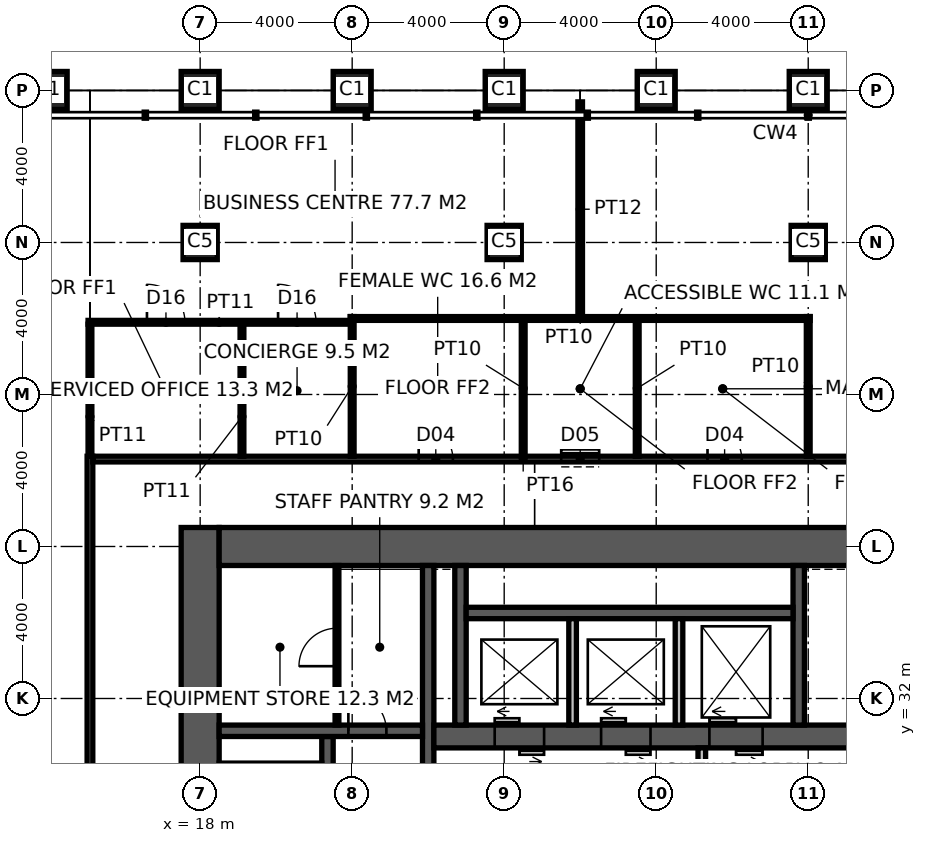
"""IFC4 building model, lengths in metres.
Left out: names, types, materials, properties, quantities, classifications, styles, units other than length and angle.
Written with IfcOpenShell. Run it as: python <this file> out.ifc"""

import sys

from ifc_helpers import new_model, si_unit, direction, frame, frame_2d, origin, origin_2d, place, context, subcontext, project, spatial, rectangle, hollow_rectangle, extrude, element, fill, save


model = new_model("IFC4")
c1 = context("Model", 3, precision=1e-05, world=origin(), true_north=direction((0.0, 1.0)))
c2 = subcontext(c1, "Body", "Model", "MODEL_VIEW")
j1 = project(units=[si_unit("LENGTHUNIT", "METRE"), si_unit("PLANEANGLEUNIT", "RADIAN")], contexts=[c1])
p1 = place(None, origin())
s1 = spatial("IfcSite", under=j1, at=p1, CompositionType="ELEMENT")
p2 = place(p1, origin())
s2 = spatial("IfcBuilding", under=s1, at=p2, CompositionType="ELEMENT")
p3 = place(p2, frame((0.0, 0.0, 76.4)))
s3 = spatial("IfcBuildingStorey", under=s2, at=p3, CompositionType="ELEMENT", Elevation=76.4)
for number, where, z_axis, x_axis in (
    (1, (14.0, 48.0, 0.0), (0.0, 0.0, 1.0), (1.0, 0.0, 0.0)),
    (2, (18.0, 48.0, 0.0), (0.0, 0.0, 1.0), (1.0, 0.0, 0.0)),
    (3, (22.0, 48.0, 0.0), (0.0, 0.0, 1.0), (1.0, 0.0, 0.0)),
    (4, (26.0, 48.0, 0.0), (0.0, 0.0, 1.0), (1.0, 0.0, 0.0)),
    (5, (30.0, 48.0, 0.0), (0.0, 0.0, 1.0), (1.0, 0.0, 0.0)),
    (6, (34.0, 48.0, 0.0), (0.0, 0.0, 1.0), (1.0, 0.0, 0.0)),
):
    element("IfcColumn", number, at=place(p3, frame(where, z_axis=z_axis, x_axis=x_axis)), inside=s3, PredefinedType="COLUMN", context=c2, shape_type="SweptSolid", body=[
        extrude(hollow_rectangle(XDim=1.0, YDim=1.0, WallThickness=0.1, at=origin_2d()), origin(), (0.0, 0.0, 1.0), 5.0),
    ])
for number, where, z_axis, x_axis in (
    (7, (18.0, 44.0, 0.0), (0.0, 0.0, 1.0), (1.0, 0.0, 0.0)),
    (8, (26.0, 44.0, 0.0), (0.0, 0.0, 1.0), (1.0, 0.0, 0.0)),
    (9, (34.0, 44.0, 0.0), (0.0, 0.0, 1.0), (1.0, 0.0, 0.0)),
):
    element("IfcColumn", number, at=place(p3, frame(where, z_axis=z_axis, x_axis=x_axis)), inside=s3, PredefinedType="COLUMN", context=c2, shape_type="SweptSolid", body=[
        extrude(hollow_rectangle(XDim=0.9, YDim=0.9, WallThickness=0.1, at=origin_2d()), origin(), (0.0, 0.0, 1.0), 5.0),
    ])
p4 = place(p3, frame((18.0, 17.5, -0.15), z_axis=(0.0, 0.0, 1.0), x_axis=(0.0, 1.0, 0.0)))
e10 = element("IfcWall", 10, at=p4, inside=s3, PredefinedType="SHEAR", context=c2, shape_type="SweptSolid", body=[
    extrude(rectangle(XDim=19.0, YDim=1.0, at=frame_2d((9.5, 0.0))), origin(), (0.0, 0.0, 1.0), 5.0),
])
p5 = place(p3, frame((18.5, 36.0, -0.15), z_axis=(0.0, 0.0, 1.0), x_axis=(1.0, 0.0, 0.0)))
e11 = element("IfcWall", 11, at=p5, inside=s3, PredefinedType="SHEAR", context=c2, shape_type="SweptSolid", body=[
    extrude(rectangle(XDim=17.6, YDim=1.0, at=frame_2d((8.8, 0.0))), origin(), (0.0, 0.0, 1.0), 5.0),
])
p6 = place(p3, frame((24.0, 18.5, -0.15), z_axis=(0.0, 0.0, 1.0), x_axis=(0.0, 1.0, 0.0)))
e12 = element("IfcWall", 12, at=p6, inside=s3, PredefinedType="SHEAR", context=c2, shape_type="SweptSolid", body=[
    extrude(rectangle(XDim=17.0, YDim=0.3, at=frame_2d((8.5, 0.0))), origin(), (0.0, 0.0, 1.0), 5.0),
])
p7 = place(p6, frame((9.6, 0.0, 0.15)))
e13 = element("IfcOpeningElement", 13, at=p7, cuts=e12, PredefinedType="OPENING", context=c2, shape_type="SweptSolid", body=[
    extrude(rectangle(XDim=1.5, YDim=2.4, at=frame_2d((0.75, 1.2))), frame((0.0, 0.16, 0.0), z_axis=(0.0, -1.0, 0.0), x_axis=(1.0, 0.0, 0.0)), (0.0, 0.0, 1.0), 0.32),
])
p8 = place(p3, frame((24.15, 31.0, -0.15), z_axis=(0.0, 0.0, 1.0), x_axis=(1.0, 0.0, 0.0)))
e14 = element("IfcWall", 14, at=p8, inside=s3, PredefinedType="SHEAR", context=c2, shape_type="SweptSolid", body=[
    extrude(rectangle(XDim=11.25, YDim=0.6, at=frame_2d((5.625, 0.0))), origin(), (0.0, 0.0, 1.0), 5.0),
])
p9 = place(p8, frame((1.6, 0.0, 0.15)))
e15 = element("IfcOpeningElement", 15, at=p9, cuts=e14, PredefinedType="OPENING", context=c2, shape_type="SweptSolid", body=[
    extrude(rectangle(XDim=1.3, YDim=2.4, at=frame_2d((0.65, 1.2))), frame((0.0, 0.31, 0.0), z_axis=(0.0, -1.0, 0.0), x_axis=(1.0, 0.0, 0.0)), (0.0, 0.0, 1.0), 0.62),
])
p10 = place(p8, frame((4.4, 0.0, 0.15)))
e16 = element("IfcOpeningElement", 16, at=p10, cuts=e14, PredefinedType="OPENING", context=c2, shape_type="SweptSolid", body=[
    extrude(rectangle(XDim=1.3, YDim=2.4, at=frame_2d((0.65, 1.2))), frame((0.0, 0.31, 0.0), z_axis=(0.0, -1.0, 0.0), x_axis=(1.0, 0.0, 0.0)), (0.0, 0.0, 1.0), 0.62),
])
p11 = place(p8, frame((7.25, 0.0, 0.15)))
e17 = element("IfcOpeningElement", 17, at=p11, cuts=e14, PredefinedType="OPENING", context=c2, shape_type="SweptSolid", body=[
    extrude(rectangle(XDim=1.4, YDim=2.4, at=frame_2d((0.7, 1.2))), frame((0.0, 0.31, 0.0), z_axis=(0.0, -1.0, 0.0), x_axis=(1.0, 0.0, 0.0)), (0.0, 0.0, 1.0), 0.62),
])
p12 = place(p3, frame((21.35, 18.5, -0.15), z_axis=(0.0, 0.0, 1.0), x_axis=(0.0, 1.0, 0.0)))
e18 = element("IfcWall", 18, at=p12, inside=s3, PredefinedType="SHEAR", context=c2, shape_type="SweptSolid", body=[
    extrude(rectangle(XDim=12.5, YDim=0.3, at=frame_2d((6.25, 0.0))), origin(), (0.0, 0.0, 1.0), 5.0),
])
p13 = place(p12, frame((0.875, 0.0, 0.15)))
e19 = element("IfcOpeningElement", 19, at=p13, cuts=e18, PredefinedType="OPENING", context=c2, shape_type="SweptSolid", body=[
    extrude(rectangle(XDim=1.1, YDim=2.2, at=frame_2d((0.55, 1.1))), frame((0.0, 0.16, 0.0), z_axis=(0.0, -1.0, 0.0), x_axis=(1.0, 0.0, 0.0)), (0.0, 0.0, 1.0), 0.32),
])
p14 = place(p12, frame((3.825, 0.0, 0.15)))
e20 = element("IfcOpeningElement", 20, at=p14, cuts=e18, PredefinedType="OPENING", context=c2, shape_type="SweptSolid", body=[
    extrude(rectangle(XDim=1.1, YDim=2.2, at=frame_2d((0.55, 1.1))), frame((0.0, 0.16, 0.0), z_axis=(0.0, -1.0, 0.0), x_axis=(1.0, 0.0, 0.0)), (0.0, 0.0, 1.0), 0.32),
])
p15 = place(p12, frame((6.675, 0.0, 0.15)))
e21 = element("IfcOpeningElement", 21, at=p15, cuts=e18, PredefinedType="OPENING", context=c2, shape_type="SweptSolid", body=[
    extrude(rectangle(XDim=1.1, YDim=2.2, at=frame_2d((0.55, 1.1))), frame((0.0, 0.16, 0.0), z_axis=(0.0, -1.0, 0.0), x_axis=(1.0, 0.0, 0.0)), (0.0, 0.0, 1.0), 0.32),
])
p16 = place(p12, frame((9.575, 0.0, 0.15)))
e22 = element("IfcOpeningElement", 22, at=p16, cuts=e18, PredefinedType="OPENING", context=c2, shape_type="SweptSolid", body=[
    extrude(rectangle(XDim=1.1, YDim=2.2, at=frame_2d((0.55, 1.1))), frame((0.0, 0.16, 0.0), z_axis=(0.0, -1.0, 0.0), x_axis=(1.0, 0.0, 0.0)), (0.0, 0.0, 1.0), 0.32),
])
p17 = place(p3, frame((18.5, 31.15, -0.15), z_axis=(0.0, 0.0, 1.0), x_axis=(1.0, 0.0, 0.0)))
e23 = element("IfcWall", 23, at=p17, inside=s3, PredefinedType="SHEAR", context=c2, shape_type="SweptSolid", body=[
    extrude(rectangle(XDim=5.35, YDim=0.3, at=frame_2d((2.675, 0.0))), origin(), (0.0, 0.0, 1.0), 5.0),
])
p18 = place(p17, frame((3.4, 0.0, 0.15)))
e24 = element("IfcOpeningElement", 24, at=p18, cuts=e23, PredefinedType="OPENING", context=c2, shape_type="SweptSolid", body=[
    extrude(rectangle(XDim=1.0, YDim=2.2, at=frame_2d((0.5, 1.1))), frame((0.0, 0.16, 0.0), z_axis=(0.0, -1.0, 0.0), x_axis=(1.0, 0.0, 0.0)), (0.0, 0.0, 1.0), 0.32),
])
for number, where, z_axis, x_axis in (
    (25, (24.85, 31.3, -0.15), (0.0, 0.0, 1.0), (0.0, 1.0, 0.0)),
    (26, (33.75, 31.3, -0.15), (0.0, 0.0, 1.0), (0.0, 1.0, 0.0)),
):
    element("IfcWall", number, at=place(p3, frame(where, z_axis=z_axis, x_axis=x_axis)), inside=s3, PredefinedType="SHEAR", context=c2, shape_type="SweptSolid", body=[
        extrude(rectangle(XDim=4.2, YDim=0.3, at=frame_2d((2.1, 0.0))), origin(), (0.0, 0.0, 1.0), 5.0),
    ])
p19 = place(p3, frame((25.0, 34.25, -0.15), z_axis=(0.0, 0.0, 1.0), x_axis=(1.0, 0.0, 0.0)))
e27 = element("IfcWall", 27, at=p19, inside=s3, PredefinedType="SHEAR", context=c2, shape_type="SweptSolid", body=[
    extrude(rectangle(XDim=8.6, YDim=0.3, at=frame_2d((4.3, 0.0))), origin(), (0.0, 0.0, 1.0), 5.0),
])
for number, where, z_axis, x_axis in (
    (28, (27.8, 31.3, -0.15), (0.0, 0.0, 1.0), (0.0, 1.0, 0.0)),
    (29, (30.6, 31.3, -0.15), (0.0, 0.0, 1.0), (0.0, 1.0, 0.0)),
):
    element("IfcWall", number, at=place(p3, frame(where, z_axis=z_axis, x_axis=x_axis)), inside=s3, PredefinedType="SOLIDWALL", context=c2, shape_type="SweptSolid", body=[
        extrude(rectangle(XDim=2.8, YDim=0.2, at=frame_2d((1.4, 0.0))), origin(), (0.0, 0.0, 1.0), 5.0),
    ])
p20 = place(p3, frame((31.2, 27.0, 0.0), z_axis=(0.0, 0.0, 1.0), x_axis=(0.0, 1.0, 0.0)))
e30 = element("IfcWall", 30, at=p20, inside=s3, PredefinedType="SOLIDWALL", context=c2, shape_type="SweptSolid", body=[
    extrude(rectangle(XDim=3.7, YDim=0.2, at=frame_2d((1.85, 0.0))), origin(), (0.0, 0.0, 1.0), 4.85),
])
p21 = place(p3, frame((21.6, 31.3, 0.0), z_axis=(0.0, 0.0, 1.0), x_axis=(0.0, 1.0, 0.0)))
e31 = element("IfcWall", 31, at=p21, inside=s3, PredefinedType="PARTITIONING", context=c2, shape_type="SweptSolid", body=[
    extrude(rectangle(XDim=4.2, YDim=0.1, at=frame_2d((2.1, 0.0))), origin(), (0.0, 0.0, 1.0), 4.85),
])
p22 = place(p21, frame((1.55, 0.0, 0.0)))
e32 = element("IfcOpeningElement", 32, at=p22, cuts=e31, PredefinedType="OPENING", context=c2, shape_type="SweptSolid", body=[
    extrude(rectangle(XDim=1.0, YDim=2.2, at=frame_2d((0.5, 1.1))), frame((0.0, 0.06, 0.0), z_axis=(0.0, -1.0, 0.0), x_axis=(1.0, 0.0, 0.0)), (0.0, 0.0, 1.0), 0.12),
])
p23 = place(p3, frame((15.1, 15.625, 0.0), z_axis=(0.0, 0.0, 1.0), x_axis=(0.0, 1.0, 0.0)))
e33 = element("IfcWall", 33, at=p23, inside=s3, PredefinedType="PARTITIONING", context=c2, shape_type="SweptSolid", body=[
    extrude(rectangle(XDim=22.75, YDim=0.15, at=frame_2d((11.375, 0.0))), origin(), (0.0, 0.0, 1.0), 4.85),
])
p24 = place(p23, frame((10.575, 0.0, 0.0)))
e34 = element("IfcOpeningElement", 34, at=p24, cuts=e33, PredefinedType="OPENING", context=c2, shape_type="SweptSolid", body=[
    extrude(rectangle(XDim=1.6, YDim=2.7, at=frame_2d((0.8, 1.35))), frame((0.0, 0.085, 0.0), z_axis=(0.0, -1.0, 0.0), x_axis=(1.0, 0.0, 0.0)), (0.0, 0.0, 1.0), 0.17),
])
p25 = place(p3, frame((15.175, 38.3, 0.0), z_axis=(0.0, 0.0, 1.0), x_axis=(1.0, 0.0, 0.0)))
e35 = element("IfcWall", 35, at=p25, inside=s3, PredefinedType="PARTITIONING", context=c2, shape_type="SweptSolid", body=[
    extrude(rectangle(XDim=22.65, YDim=0.15, at=frame_2d((11.325, 0.0))), origin(), (0.0, 0.0, 1.0), 4.85),
])
p26 = place(p25, frame((8.575, 0.0, 0.0)))
e36 = element("IfcOpeningElement", 36, at=p26, cuts=e35, PredefinedType="OPENING", context=c2, shape_type="SweptSolid", body=[
    extrude(rectangle(XDim=0.9, YDim=2.1, at=frame_2d((0.45, 1.05))), frame((0.0, 0.085, 0.0), z_axis=(0.0, -1.0, 0.0), x_axis=(1.0, 0.0, 0.0)), (0.0, 0.0, 1.0), 0.17),
])
p27 = place(p25, frame((12.325, 0.0, 0.0)))
e37 = element("IfcOpeningElement", 37, at=p27, cuts=e35, PredefinedType="OPENING", context=c2, shape_type="SweptSolid", body=[
    extrude(rectangle(XDim=1.0, YDim=2.1, at=frame_2d((0.5, 1.05))), frame((0.0, 0.085, 0.0), z_axis=(0.0, -1.0, 0.0), x_axis=(1.0, 0.0, 0.0)), (0.0, 0.0, 1.0), 0.17),
])
p28 = place(p25, frame((16.175, 0.0, 0.0)))
e38 = element("IfcOpeningElement", 38, at=p28, cuts=e35, PredefinedType="OPENING", context=c2, shape_type="SweptSolid", body=[
    extrude(rectangle(XDim=0.9, YDim=2.1, at=frame_2d((0.45, 1.05))), frame((0.0, 0.085, 0.0), z_axis=(0.0, -1.0, 0.0), x_axis=(1.0, 0.0, 0.0)), (0.0, 0.0, 1.0), 0.17),
])
for number, where, z_axis, x_axis in (
    (39, (22.0, 38.375, 0.0), (0.0, 0.0, 1.0), (0.0, 1.0, 0.0)),
    (40, (34.0, 38.375, 0.0), (0.0, 0.0, 1.0), (0.0, 1.0, 0.0)),
):
    element("IfcWall", number, at=place(p3, frame(where, z_axis=z_axis, x_axis=x_axis)), inside=s3, PredefinedType="PARTITIONING", context=c2, shape_type="SweptSolid", body=[
        extrude(rectangle(XDim=3.675, YDim=0.1, at=frame_2d((1.837, 0.0))), origin(), (0.0, 0.0, 1.0), 3.95),
    ])
p29 = place(p3, frame((21.95, 42.0, 0.0), z_axis=(0.0, 0.0, 1.0), x_axis=(1.0, 0.0, 0.0)))
e41 = element("IfcWall", 41, at=p29, inside=s3, PredefinedType="PARTITIONING", context=c2, shape_type="SweptSolid", body=[
    extrude(rectangle(XDim=12.1, YDim=0.1, at=frame_2d((6.05, 0.0))), origin(), (0.0, 0.0, 1.0), 4.85),
])
for number, where, z_axis, x_axis in (
    (42, (26.5, 38.375, 0.0), (0.0, 0.0, 1.0), (0.0, 1.0, 0.0)),
    (43, (29.5, 38.375, 0.0), (0.0, 0.0, 1.0), (0.0, 1.0, 0.0)),
):
    element("IfcWall", number, at=place(p3, frame(where, z_axis=z_axis, x_axis=x_axis)), inside=s3, PredefinedType="PARTITIONING", context=c2, shape_type="SweptSolid", body=[
        extrude(rectangle(XDim=3.575, YDim=0.1, at=frame_2d((1.788, 0.0))), origin(), (0.0, 0.0, 1.0), 4.85),
    ])
p30 = place(p3, frame((28.0, 42.05, 0.0), z_axis=(0.0, 0.0, 1.0), x_axis=(0.0, 1.0, 0.0)))
e44 = element("IfcWall", 44, at=p30, inside=s3, PredefinedType="PARTITIONING", context=c2, shape_type="SweptSolid", body=[
    extrude(rectangle(XDim=5.65, YDim=0.12, at=frame_2d((2.825, 0.0))), origin(), (0.0, 0.0, 1.0), 4.85),
])
p31 = place(p3, frame((15.05, 41.9, 0.0), z_axis=(0.0, 0.0, 1.0), x_axis=(1.0, 0.0, 0.0)))
e45 = element("IfcWall", 45, at=p31, inside=s3, PredefinedType="PARTITIONING", context=c2, shape_type="SweptSolid", body=[
    extrude(rectangle(XDim=6.9, YDim=0.1, at=frame_2d((3.45, 0.0))), origin(), (0.0, 0.0, 1.0), 4.85),
])
p32 = place(p31, frame((1.55, 0.0, 0.0)))
e46 = element("IfcOpeningElement", 46, at=p32, cuts=e45, PredefinedType="OPENING", context=c2, shape_type="SweptSolid", body=[
    extrude(rectangle(XDim=1.0, YDim=2.2, at=frame_2d((0.5, 1.1))), frame((0.0, 0.06, 0.0), z_axis=(0.0, -1.0, 0.0), x_axis=(1.0, 0.0, 0.0)), (0.0, 0.0, 1.0), 0.12),
])
p33 = place(p31, frame((5.0, 0.0, 0.0)))
e47 = element("IfcOpeningElement", 47, at=p33, cuts=e45, PredefinedType="OPENING", context=c2, shape_type="SweptSolid", body=[
    extrude(rectangle(XDim=1.0, YDim=2.2, at=frame_2d((0.5, 1.1))), frame((0.0, 0.06, 0.0), z_axis=(0.0, -1.0, 0.0), x_axis=(1.0, 0.0, 0.0)), (0.0, 0.0, 1.0), 0.12),
])
for number, where, z_axis, x_axis in (
    (48, (15.1, 38.375, 0.0), (0.0, 0.0, 1.0), (0.0, 1.0, 0.0)),
    (49, (19.1, 38.375, 0.0), (0.0, 0.0, 1.0), (0.0, 1.0, 0.0)),
):
    element("IfcWall", number, at=place(p3, frame(where, z_axis=z_axis, x_axis=x_axis)), inside=s3, PredefinedType="PARTITIONING", context=c2, shape_type="SweptSolid", body=[
        extrude(rectangle(XDim=3.475, YDim=0.1, at=frame_2d((1.738, 0.0))), origin(), (0.0, 0.0, 1.0), 4.85),
    ])
p34 = place(p18, origin())
e50 = element("IfcDoor", 50, at=p34, inside=s3, OperationType="SINGLE_SWING_LEFT", PredefinedType="DOOR", context=c2, shape_type="SweptSolid", body=[
    extrude(rectangle(XDim=1.0, YDim=2.2, at=frame_2d((0.5, 1.1))), frame((0.0, 0.025, 0.0), z_axis=(0.0, -1.0, 0.0), x_axis=(1.0, 0.0, 0.0)), (0.0, 0.0, 1.0), 0.05),
])
fill(e24, e50)
p35 = place(p22, origin())
e51 = element("IfcDoor", 51, at=p35, inside=s3, OperationType="SINGLE_SWING_LEFT", PredefinedType="DOOR", context=c2, shape_type="SweptSolid", body=[
    extrude(rectangle(XDim=1.0, YDim=2.2, at=frame_2d((0.5, 1.1))), frame((0.0, 0.025, 0.0), z_axis=(0.0, -1.0, 0.0), x_axis=(1.0, 0.0, 0.0)), (0.0, 0.0, 1.0), 0.05),
])
fill(e32, e51)
p36 = place(p26, origin())
e52 = element("IfcDoor", 52, at=p36, inside=s3, OperationType="SINGLE_SWING_LEFT", PredefinedType="DOOR", context=c2, shape_type="SweptSolid", body=[
    extrude(rectangle(XDim=0.9, YDim=2.1, at=frame_2d((0.45, 1.05))), frame((0.0, 0.025, 0.0), z_axis=(0.0, -1.0, 0.0), x_axis=(1.0, 0.0, 0.0)), (0.0, 0.0, 1.0), 0.05),
])
fill(e36, e52)
p37 = place(p27, origin())
e53 = element("IfcDoor", 53, at=p37, inside=s3, OperationType="SLIDING_TO_LEFT", PredefinedType="DOOR", context=c2, shape_type="SweptSolid", body=[
    extrude(rectangle(XDim=1.0, YDim=2.1, at=frame_2d((0.5, 1.05))), frame((0.0, 0.025, 0.0), z_axis=(0.0, -1.0, 0.0), x_axis=(1.0, 0.0, 0.0)), (0.0, 0.0, 1.0), 0.05),
])
fill(e37, e53)
p38 = place(p28, origin())
e54 = element("IfcDoor", 54, at=p38, inside=s3, OperationType="SINGLE_SWING_LEFT", PredefinedType="DOOR", context=c2, shape_type="SweptSolid", body=[
    extrude(rectangle(XDim=0.9, YDim=2.1, at=frame_2d((0.45, 1.05))), frame((0.0, 0.025, 0.0), z_axis=(0.0, -1.0, 0.0), x_axis=(1.0, 0.0, 0.0)), (0.0, 0.0, 1.0), 0.05),
])
fill(e38, e54)
p39 = place(p32, origin())
e55 = element("IfcDoor", 55, at=p39, inside=s3, OperationType="SINGLE_SWING_LEFT", PredefinedType="DOOR", context=c2, shape_type="SweptSolid", body=[
    extrude(rectangle(XDim=1.0, YDim=2.2, at=frame_2d((0.5, 1.1))), frame((0.0, 0.025, 0.0), z_axis=(0.0, -1.0, 0.0), x_axis=(1.0, 0.0, 0.0)), (0.0, 0.0, 1.0), 0.05),
])
fill(e46, e55)
p40 = place(p33, origin())
e56 = element("IfcDoor", 56, at=p40, inside=s3, OperationType="SINGLE_SWING_LEFT", PredefinedType="DOOR", context=c2, shape_type="SweptSolid", body=[
    extrude(rectangle(XDim=1.0, YDim=2.2, at=frame_2d((0.5, 1.1))), frame((0.0, 0.025, 0.0), z_axis=(0.0, -1.0, 0.0), x_axis=(1.0, 0.0, 0.0)), (0.0, 0.0, 1.0), 0.05),
])
fill(e47, e56)
p41 = place(p9, origin())
e57 = element("IfcDoor", 57, at=p41, inside=s3, OperationType="DOUBLE_DOOR_SLIDING", PredefinedType="DOOR", context=c2, shape_type="SweptSolid", body=[
    extrude(rectangle(XDim=1.3, YDim=2.4, at=frame_2d((0.65, 1.2))), frame((0.0, 0.025, 0.0), z_axis=(0.0, -1.0, 0.0), x_axis=(1.0, 0.0, 0.0)), (0.0, 0.0, 1.0), 0.05),
])
fill(e15, e57)
p42 = place(p10, origin())
e58 = element("IfcDoor", 58, at=p42, inside=s3, OperationType="DOUBLE_DOOR_SLIDING", PredefinedType="DOOR", context=c2, shape_type="SweptSolid", body=[
    extrude(rectangle(XDim=1.3, YDim=2.4, at=frame_2d((0.65, 1.2))), frame((0.0, 0.025, 0.0), z_axis=(0.0, -1.0, 0.0), x_axis=(1.0, 0.0, 0.0)), (0.0, 0.0, 1.0), 0.05),
])
fill(e16, e58)
p43 = place(p11, origin())
e59 = element("IfcDoor", 59, at=p43, inside=s3, OperationType="DOUBLE_DOOR_SLIDING", PredefinedType="DOOR", context=c2, shape_type="SweptSolid", body=[
    extrude(rectangle(XDim=1.4, YDim=2.4, at=frame_2d((0.7, 1.2))), frame((0.0, 0.025, 0.0), z_axis=(0.0, -1.0, 0.0), x_axis=(1.0, 0.0, 0.0)), (0.0, 0.0, 1.0), 0.05),
])
fill(e17, e59)
save(model, sys.argv[1])
